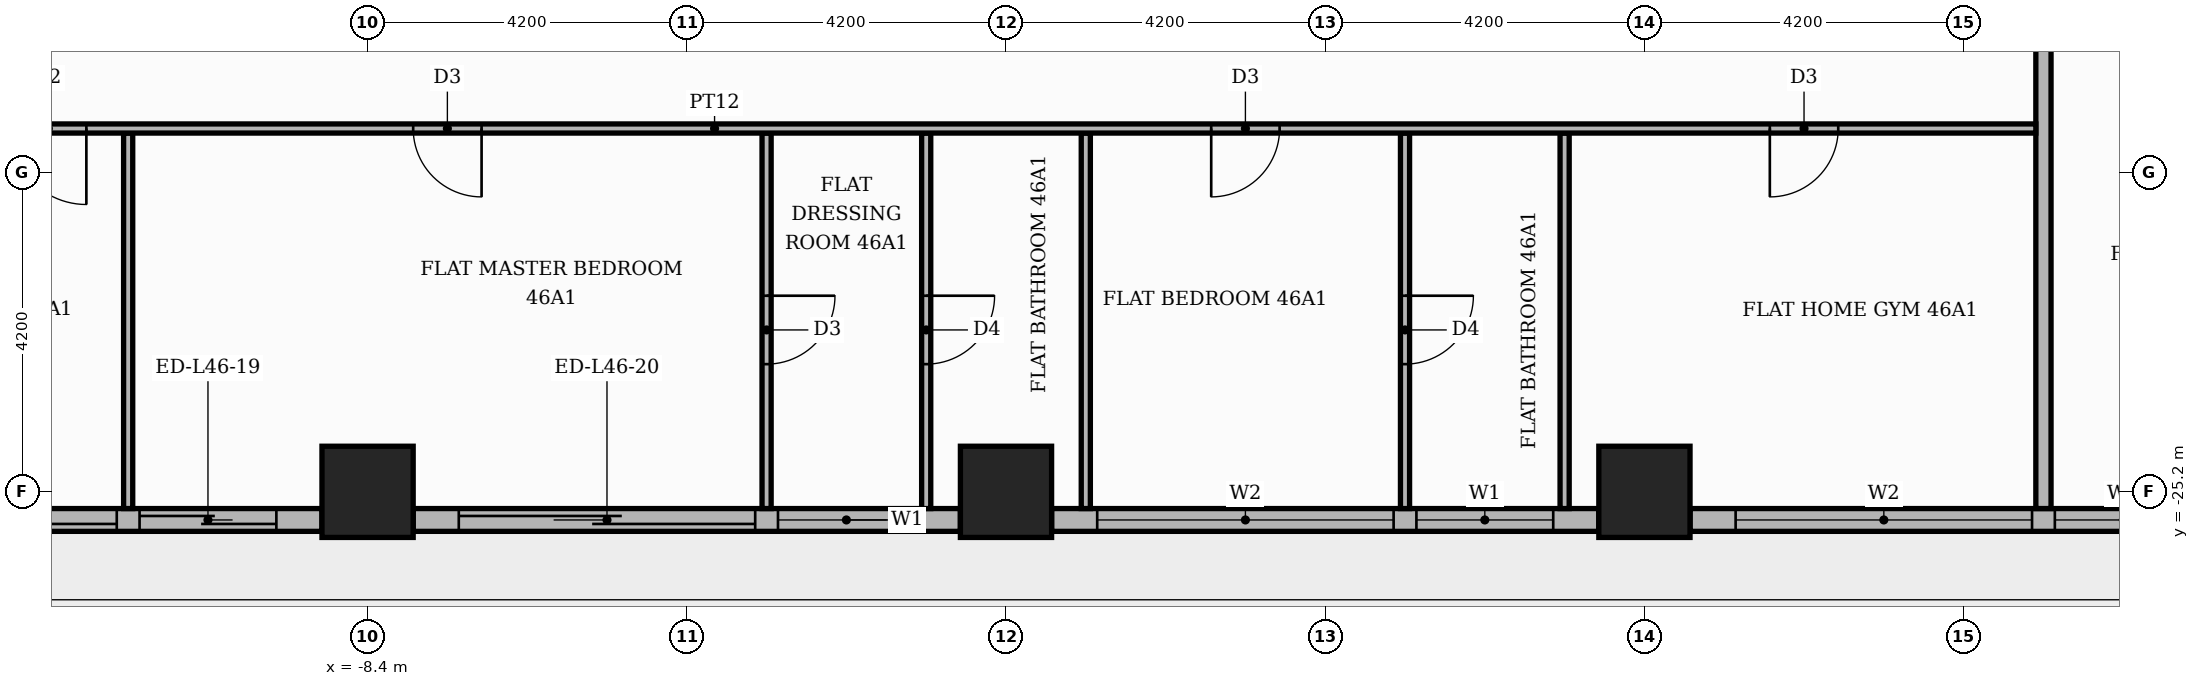
"""IFC4 building model, lengths in metres.
Left out: names, types, materials, properties, quantities, classifications, styles, units other than length and angle.
Written with IfcOpenShell. Run it as: python <this file> out.ifc"""

import sys

from ifc_helpers import new_model, si_unit, direction, frame, frame_2d, origin, origin_2d, place, context, subcontext, project, spatial, rectangle, extrude, element, fill, save


model = new_model("IFC4")
c1 = context("Model", 3, precision=1e-05, world=origin(), true_north=direction((0.0, 1.0)))
c2 = subcontext(c1, "Body", "Model", "MODEL_VIEW")
j1 = project(units=[si_unit("LENGTHUNIT", "METRE"), si_unit("PLANEANGLEUNIT", "RADIAN")], contexts=[c1])
p1 = place(None, origin())
s1 = spatial("IfcSite", under=j1, at=p1, CompositionType="ELEMENT")
p2 = place(p1, origin())
s2 = spatial("IfcBuilding", under=s1, at=p2, CompositionType="ELEMENT")
p3 = place(p2, frame((0.0, 0.0, 196.2)))
s3 = spatial("IfcBuildingStorey", under=s2, at=p3, CompositionType="ELEMENT", Elevation=196.2)
for number, where, z_axis, x_axis in (
    (1, (0.0, -25.2, 0.0), (0.0, 0.0, 1.0), (1.0, 0.0, 0.0)),
    (2, (8.4, -25.2, 0.0), (0.0, 0.0, 1.0), (1.0, 0.0, 0.0)),
    (3, (-8.4, -25.2, 0.0), (0.0, 0.0, 1.0), (1.0, 0.0, 0.0)),
):
    element("IfcColumn", number, at=place(p3, frame(where, z_axis=z_axis, x_axis=x_axis)), inside=s3, PredefinedType="COLUMN", context=c2, shape_type="SweptSolid", body=[
        extrude(rectangle(XDim=1.2, YDim=1.2, at=origin_2d()), origin(), (0.0, 0.0, 1.0), 3.9),
    ])
p4 = place(p3, frame((-16.2, -25.57, 0.0), z_axis=(0.0, 0.0, 1.0), x_axis=(1.0, 0.0, 0.0)))
e4 = element("IfcWall", 4, at=p4, inside=s3, PredefinedType="STANDARD", context=c2, shape_type="SweptSolid", body=[
    extrude(rectangle(XDim=7.2, YDim=0.3, at=frame_2d((3.6, 0.0))), origin(), (0.0, 0.0, 1.0), 3.48),
])
p5 = place(p4, frame((0.6, 0.0, 0.0)))
e5 = element("IfcOpeningElement", 5, at=p5, cuts=e4, PredefinedType="OPENING", context=c2, shape_type="SweptSolid", body=[
    extrude(rectangle(XDim=3.9, YDim=2.4, at=frame_2d((1.95, 1.2))), frame((0.0, 0.16, 0.0), z_axis=(0.0, -1.0, 0.0), x_axis=(1.0, 0.0, 0.0)), (0.0, 0.0, 1.0), 0.32),
])
p6 = place(p4, frame((4.8, 0.0, 0.0)))
e6 = element("IfcOpeningElement", 6, at=p6, cuts=e4, PredefinedType="OPENING", context=c2, shape_type="SweptSolid", body=[
    extrude(rectangle(XDim=1.8, YDim=2.4, at=frame_2d((0.9, 1.2))), frame((0.0, 0.16, 0.0), z_axis=(0.0, -1.0, 0.0), x_axis=(1.0, 0.0, 0.0)), (0.0, 0.0, 1.0), 0.32),
])
p7 = place(p3, frame((-7.8, -25.57, 0.0), z_axis=(0.0, 0.0, 1.0), x_axis=(1.0, 0.0, 0.0)))
e7 = element("IfcWall", 7, at=p7, inside=s3, PredefinedType="STANDARD", context=c2, shape_type="SweptSolid", body=[
    extrude(rectangle(XDim=7.2, YDim=0.3, at=frame_2d((3.6, 0.0))), origin(), (0.0, 0.0, 1.0), 3.48),
])
p8 = place(p7, frame((0.6, 0.0, 0.0)))
e8 = element("IfcOpeningElement", 8, at=p8, cuts=e7, PredefinedType="OPENING", context=c2, shape_type="SweptSolid", body=[
    extrude(rectangle(XDim=3.9, YDim=2.4, at=frame_2d((1.95, 1.2))), frame((0.0, 0.16, 0.0), z_axis=(0.0, -1.0, 0.0), x_axis=(1.0, 0.0, 0.0)), (0.0, 0.0, 1.0), 0.32),
])
p9 = place(p7, frame((4.8, 0.0, 0.9)))
e9 = element("IfcOpeningElement", 9, at=p9, cuts=e7, PredefinedType="OPENING", context=c2, shape_type="SweptSolid", body=[
    extrude(rectangle(XDim=1.8, YDim=2.1, at=frame_2d((0.9, 1.05))), frame((0.0, 0.16, 0.0), z_axis=(0.0, -1.0, 0.0), x_axis=(1.0, 0.0, 0.0)), (0.0, 0.0, 1.0), 0.32),
])
p10 = place(p3, frame((0.6, -25.57, 0.0), z_axis=(0.0, 0.0, 1.0), x_axis=(1.0, 0.0, 0.0)))
e10 = element("IfcWall", 10, at=p10, inside=s3, PredefinedType="STANDARD", context=c2, shape_type="SweptSolid", body=[
    extrude(rectangle(XDim=7.2, YDim=0.3, at=frame_2d((3.6, 0.0))), origin(), (0.0, 0.0, 1.0), 3.48),
])
p11 = place(p10, frame((0.6, 0.0, 0.9)))
e11 = element("IfcOpeningElement", 11, at=p11, cuts=e10, PredefinedType="OPENING", context=c2, shape_type="SweptSolid", body=[
    extrude(rectangle(XDim=3.9, YDim=2.1, at=frame_2d((1.95, 1.05))), frame((0.0, 0.16, 0.0), z_axis=(0.0, -1.0, 0.0), x_axis=(1.0, 0.0, 0.0)), (0.0, 0.0, 1.0), 0.32),
])
p12 = place(p10, frame((4.8, 0.0, 0.9)))
e12 = element("IfcOpeningElement", 12, at=p12, cuts=e10, PredefinedType="OPENING", context=c2, shape_type="SweptSolid", body=[
    extrude(rectangle(XDim=1.8, YDim=2.1, at=frame_2d((0.9, 1.05))), frame((0.0, 0.16, 0.0), z_axis=(0.0, -1.0, 0.0), x_axis=(1.0, 0.0, 0.0)), (0.0, 0.0, 1.0), 0.32),
])
p13 = place(p3, frame((9.0, -25.57, 0.0), z_axis=(0.0, 0.0, 1.0), x_axis=(1.0, 0.0, 0.0)))
e13 = element("IfcWall", 13, at=p13, inside=s3, PredefinedType="STANDARD", context=c2, shape_type="SweptSolid", body=[
    extrude(rectangle(XDim=7.2, YDim=0.3, at=frame_2d((3.6, 0.0))), origin(), (0.0, 0.0, 1.0), 3.48),
])
p14 = place(p13, frame((0.6, 0.0, 0.9)))
e14 = element("IfcOpeningElement", 14, at=p14, cuts=e13, PredefinedType="OPENING", context=c2, shape_type="SweptSolid", body=[
    extrude(rectangle(XDim=3.9, YDim=2.1, at=frame_2d((1.95, 1.05))), frame((0.0, 0.16, 0.0), z_axis=(0.0, -1.0, 0.0), x_axis=(1.0, 0.0, 0.0)), (0.0, 0.0, 1.0), 0.32),
])
p15 = place(p13, frame((4.8, 0.0, 0.9)))
e15 = element("IfcOpeningElement", 15, at=p15, cuts=e13, PredefinedType="OPENING", context=c2, shape_type="SweptSolid", body=[
    extrude(rectangle(XDim=1.8, YDim=2.1, at=frame_2d((0.9, 1.05))), frame((0.0, 0.16, 0.0), z_axis=(0.0, -1.0, 0.0), x_axis=(1.0, 0.0, 0.0)), (0.0, 0.0, 1.0), 0.32),
])
p16 = place(p3, frame((-11.55, -25.42, 0.0), z_axis=(0.0, 0.0, 1.0), x_axis=(0.0, 1.0, 0.0)))
e16 = element("IfcWall", 16, at=p16, inside=s3, PredefinedType="PARTITIONING", context=c2, shape_type="SweptSolid", body=[
    extrude(rectangle(XDim=4.94, YDim=0.12, at=frame_2d((2.47, 0.0))), origin(), (0.0, 0.0, 1.0), 3.48),
])
p17 = place(p3, frame((-3.15, -25.42, 0.0), z_axis=(0.0, 0.0, 1.0), x_axis=(0.0, 1.0, 0.0)))
e17 = element("IfcWall", 17, at=p17, inside=s3, PredefinedType="PARTITIONING", context=c2, shape_type="SweptSolid", body=[
    extrude(rectangle(XDim=4.94, YDim=0.12, at=frame_2d((2.47, 0.0))), origin(), (0.0, 0.0, 1.0), 3.48),
])
p18 = place(p17, frame((1.9, 0.0, 0.0)))
e18 = element("IfcOpeningElement", 18, at=p18, cuts=e17, PredefinedType="OPENING", context=c2, shape_type="SweptSolid", body=[
    extrude(rectangle(XDim=0.9, YDim=2.1, at=frame_2d((0.45, 1.05))), frame((0.0, 0.07, 0.0), z_axis=(0.0, -1.0, 0.0), x_axis=(1.0, 0.0, 0.0)), (0.0, 0.0, 1.0), 0.14),
])
p19 = place(p3, frame((-1.05, -25.42, 0.0), z_axis=(0.0, 0.0, 1.0), x_axis=(0.0, 1.0, 0.0)))
e19 = element("IfcWall", 19, at=p19, inside=s3, PredefinedType="PARTITIONING", context=c2, shape_type="SweptSolid", body=[
    extrude(rectangle(XDim=4.94, YDim=0.12, at=frame_2d((2.47, 0.0))), origin(), (0.0, 0.0, 1.0), 3.48),
])
p20 = place(p19, frame((1.9, 0.0, 0.0)))
e20 = element("IfcOpeningElement", 20, at=p20, cuts=e19, PredefinedType="OPENING", context=c2, shape_type="SweptSolid", body=[
    extrude(rectangle(XDim=0.9, YDim=2.1, at=frame_2d((0.45, 1.05))), frame((0.0, 0.07, 0.0), z_axis=(0.0, -1.0, 0.0), x_axis=(1.0, 0.0, 0.0)), (0.0, 0.0, 1.0), 0.14),
])
p21 = place(p3, frame((1.05, -25.42, 0.0), z_axis=(0.0, 0.0, 1.0), x_axis=(0.0, 1.0, 0.0)))
e21 = element("IfcWall", 21, at=p21, inside=s3, PredefinedType="PARTITIONING", context=c2, shape_type="SweptSolid", body=[
    extrude(rectangle(XDim=4.94, YDim=0.12, at=frame_2d((2.47, 0.0))), origin(), (0.0, 0.0, 1.0), 3.48),
])
p22 = place(p3, frame((5.25, -25.42, 0.0), z_axis=(0.0, 0.0, 1.0), x_axis=(0.0, 1.0, 0.0)))
e22 = element("IfcWall", 22, at=p22, inside=s3, PredefinedType="PARTITIONING", context=c2, shape_type="SweptSolid", body=[
    extrude(rectangle(XDim=4.94, YDim=0.12, at=frame_2d((2.47, 0.0))), origin(), (0.0, 0.0, 1.0), 3.48),
])
p23 = place(p22, frame((1.9, 0.0, 0.0)))
e23 = element("IfcOpeningElement", 23, at=p23, cuts=e22, PredefinedType="OPENING", context=c2, shape_type="SweptSolid", body=[
    extrude(rectangle(XDim=0.9, YDim=2.1, at=frame_2d((0.45, 1.05))), frame((0.0, 0.07, 0.0), z_axis=(0.0, -1.0, 0.0), x_axis=(1.0, 0.0, 0.0)), (0.0, 0.0, 1.0), 0.14),
])
p24 = place(p3, frame((7.35, -25.42, 0.0), z_axis=(0.0, 0.0, 1.0), x_axis=(0.0, 1.0, 0.0)))
e24 = element("IfcWall", 24, at=p24, inside=s3, PredefinedType="PARTITIONING", context=c2, shape_type="SweptSolid", body=[
    extrude(rectangle(XDim=4.94, YDim=0.12, at=frame_2d((2.47, 0.0))), origin(), (0.0, 0.0, 1.0), 3.48),
])
p25 = place(p3, frame((13.65, -25.42, 0.0), z_axis=(0.0, 0.0, 1.0), x_axis=(0.0, 1.0, 0.0)))
e25 = element("IfcWall", 25, at=p25, inside=s3, PredefinedType="PARTITIONING", context=c2, shape_type="SweptSolid", body=[
    extrude(rectangle(XDim=11.67, YDim=0.2, at=frame_2d((5.835, 0.0))), origin(), (0.0, 0.0, 1.0), 3.48),
])
p26 = place(p3, frame((-21.219, -20.42, 0.0), z_axis=(0.0, 0.0, 1.0), x_axis=(1.0, 0.0, 0.0)))
e26 = element("IfcWall", 26, at=p26, inside=s3, PredefinedType="PARTITIONING", context=c2, shape_type="SweptSolid", body=[
    extrude(rectangle(XDim=34.769, YDim=0.12, at=frame_2d((17.385, 0.0))), origin(), (0.0, 0.0, 1.0), 3.48),
])
p27 = place(p26, frame((8.119, 0.0, 0.0)))
e27 = element("IfcOpeningElement", 27, at=p27, cuts=e26, PredefinedType="OPENING", context=c2, shape_type="SweptSolid", body=[
    extrude(rectangle(XDim=1.0, YDim=2.1, at=frame_2d((0.5, 1.05))), frame((0.0, 0.07, 0.0), z_axis=(0.0, -1.0, 0.0), x_axis=(1.0, 0.0, 0.0)), (0.0, 0.0, 1.0), 0.14),
])
p28 = place(p26, frame((13.419, 0.0, 0.0)))
e28 = element("IfcOpeningElement", 28, at=p28, cuts=e26, PredefinedType="OPENING", context=c2, shape_type="SweptSolid", body=[
    extrude(rectangle(XDim=0.9, YDim=2.1, at=frame_2d((0.45, 1.05))), frame((0.0, 0.07, 0.0), z_axis=(0.0, -1.0, 0.0), x_axis=(1.0, 0.0, 0.0)), (0.0, 0.0, 1.0), 0.14),
])
p29 = place(p26, frame((23.919, 0.0, 0.0)))
e29 = element("IfcOpeningElement", 29, at=p29, cuts=e26, PredefinedType="OPENING", context=c2, shape_type="SweptSolid", body=[
    extrude(rectangle(XDim=0.9, YDim=2.1, at=frame_2d((0.45, 1.05))), frame((0.0, 0.07, 0.0), z_axis=(0.0, -1.0, 0.0), x_axis=(1.0, 0.0, 0.0)), (0.0, 0.0, 1.0), 0.14),
])
p30 = place(p26, frame((31.269, 0.0, 0.0)))
e30 = element("IfcOpeningElement", 30, at=p30, cuts=e26, PredefinedType="OPENING", context=c2, shape_type="SweptSolid", body=[
    extrude(rectangle(XDim=0.9, YDim=2.1, at=frame_2d((0.45, 1.05))), frame((0.0, 0.07, 0.0), z_axis=(0.0, -1.0, 0.0), x_axis=(1.0, 0.0, 0.0)), (0.0, 0.0, 1.0), 0.14),
])
p31 = place(p5, origin())
e31 = element("IfcDoor", 31, at=p31, inside=s3, OperationType="SLIDING_TO_LEFT", PredefinedType="DOOR", context=c2, shape_type="SweptSolid", body=[
    extrude(rectangle(XDim=3.9, YDim=2.4, at=frame_2d((1.95, 1.2))), frame((0.0, 0.025, 0.0), z_axis=(0.0, -1.0, 0.0), x_axis=(1.0, 0.0, 0.0)), (0.0, 0.0, 1.0), 0.05),
])
fill(e5, e31)
p32 = place(p6, origin())
e32 = element("IfcDoor", 32, at=p32, inside=s3, OperationType="SLIDING_TO_RIGHT", PredefinedType="DOOR", context=c2, shape_type="SweptSolid", body=[
    extrude(rectangle(XDim=1.8, YDim=2.4, at=frame_2d((0.9, 1.2))), frame((0.0, 0.025, 0.0), z_axis=(0.0, -1.0, 0.0), x_axis=(1.0, 0.0, 0.0)), (0.0, 0.0, 1.0), 0.05),
])
fill(e6, e32)
p33 = place(p8, origin())
e33 = element("IfcDoor", 33, at=p33, inside=s3, OperationType="SLIDING_TO_LEFT", PredefinedType="DOOR", context=c2, shape_type="SweptSolid", body=[
    extrude(rectangle(XDim=3.9, YDim=2.4, at=frame_2d((1.95, 1.2))), frame((0.0, 0.025, 0.0), z_axis=(0.0, -1.0, 0.0), x_axis=(1.0, 0.0, 0.0)), (0.0, 0.0, 1.0), 0.05),
])
fill(e8, e33)
p34 = place(p9, origin())
e34 = element("IfcWindow", 34, at=p34, inside=s3, PartitioningType="SINGLE_PANEL", PredefinedType="WINDOW", context=c2, shape_type="SweptSolid", body=[
    extrude(rectangle(XDim=1.8, YDim=2.1, at=frame_2d((0.9, 1.05))), frame((0.0, 0.03, 0.0), z_axis=(0.0, -1.0, 0.0), x_axis=(1.0, 0.0, 0.0)), (0.0, 0.0, 1.0), 0.06),
])
fill(e9, e34)
p35 = place(p11, origin())
e35 = element("IfcWindow", 35, at=p35, inside=s3, PartitioningType="SINGLE_PANEL", PredefinedType="WINDOW", context=c2, shape_type="SweptSolid", body=[
    extrude(rectangle(XDim=3.9, YDim=2.1, at=frame_2d((1.95, 1.05))), frame((0.0, 0.03, 0.0), z_axis=(0.0, -1.0, 0.0), x_axis=(1.0, 0.0, 0.0)), (0.0, 0.0, 1.0), 0.06),
])
fill(e11, e35)
p36 = place(p12, origin())
e36 = element("IfcWindow", 36, at=p36, inside=s3, PartitioningType="SINGLE_PANEL", PredefinedType="WINDOW", context=c2, shape_type="SweptSolid", body=[
    extrude(rectangle(XDim=1.8, YDim=2.1, at=frame_2d((0.9, 1.05))), frame((0.0, 0.03, 0.0), z_axis=(0.0, -1.0, 0.0), x_axis=(1.0, 0.0, 0.0)), (0.0, 0.0, 1.0), 0.06),
])
fill(e12, e36)
p37 = place(p14, origin())
e37 = element("IfcWindow", 37, at=p37, inside=s3, PartitioningType="SINGLE_PANEL", PredefinedType="WINDOW", context=c2, shape_type="SweptSolid", body=[
    extrude(rectangle(XDim=3.9, YDim=2.1, at=frame_2d((1.95, 1.05))), frame((0.0, 0.03, 0.0), z_axis=(0.0, -1.0, 0.0), x_axis=(1.0, 0.0, 0.0)), (0.0, 0.0, 1.0), 0.06),
])
fill(e14, e37)
p38 = place(p15, origin())
e38 = element("IfcWindow", 38, at=p38, inside=s3, PartitioningType="SINGLE_PANEL", PredefinedType="WINDOW", context=c2, shape_type="SweptSolid", body=[
    extrude(rectangle(XDim=1.8, YDim=2.1, at=frame_2d((0.9, 1.05))), frame((0.0, 0.03, 0.0), z_axis=(0.0, -1.0, 0.0), x_axis=(1.0, 0.0, 0.0)), (0.0, 0.0, 1.0), 0.06),
])
fill(e15, e38)
p39 = place(p27, frame((1.0, 0.0, 0.0), z_axis=(0.0, 0.0, 1.0), x_axis=(-1.0, 0.0, 0.0)))
e39 = element("IfcDoor", 39, at=p39, inside=s3, OperationType="SINGLE_SWING_RIGHT", PredefinedType="DOOR", context=c2, shape_type="SweptSolid", body=[
    extrude(rectangle(XDim=1.0, YDim=2.1, at=frame_2d((0.5, 1.05))), frame((0.0, 0.025, 0.0), z_axis=(0.0, -1.0, 0.0), x_axis=(1.0, 0.0, 0.0)), (0.0, 0.0, 1.0), 0.05),
])
fill(e27, e39)
p40 = place(p28, frame((0.9, 0.0, 0.0), z_axis=(0.0, 0.0, 1.0), x_axis=(-1.0, 0.0, 0.0)))
e40 = element("IfcDoor", 40, at=p40, inside=s3, OperationType="SINGLE_SWING_RIGHT", PredefinedType="DOOR", context=c2, shape_type="SweptSolid", body=[
    extrude(rectangle(XDim=0.9, YDim=2.1, at=frame_2d((0.45, 1.05))), frame((0.0, 0.025, 0.0), z_axis=(0.0, -1.0, 0.0), x_axis=(1.0, 0.0, 0.0)), (0.0, 0.0, 1.0), 0.05),
])
fill(e28, e40)
p41 = place(p18, frame((0.9, 0.0, 0.0), z_axis=(0.0, 0.0, 1.0), x_axis=(-1.0, 0.0, 0.0)))
e41 = element("IfcDoor", 41, at=p41, inside=s3, OperationType="SINGLE_SWING_RIGHT", PredefinedType="DOOR", context=c2, shape_type="SweptSolid", body=[
    extrude(rectangle(XDim=0.9, YDim=2.1, at=frame_2d((0.45, 1.05))), frame((0.0, 0.025, 0.0), z_axis=(0.0, -1.0, 0.0), x_axis=(1.0, 0.0, 0.0)), (0.0, 0.0, 1.0), 0.05),
])
fill(e18, e41)
p42 = place(p20, frame((0.9, 0.0, 0.0), z_axis=(0.0, 0.0, 1.0), x_axis=(-1.0, 0.0, 0.0)))
e42 = element("IfcDoor", 42, at=p42, inside=s3, OperationType="SINGLE_SWING_RIGHT", PredefinedType="DOOR", context=c2, shape_type="SweptSolid", body=[
    extrude(rectangle(XDim=0.9, YDim=2.1, at=frame_2d((0.45, 1.05))), frame((0.0, 0.025, 0.0), z_axis=(0.0, -1.0, 0.0), x_axis=(1.0, 0.0, 0.0)), (0.0, 0.0, 1.0), 0.05),
])
fill(e20, e42)
p43 = place(p29, frame((0.9, 0.0, 0.0), z_axis=(0.0, 0.0, 1.0), x_axis=(-1.0, 0.0, 0.0)))
e43 = element("IfcDoor", 43, at=p43, inside=s3, OperationType="SINGLE_SWING_LEFT", PredefinedType="DOOR", context=c2, shape_type="SweptSolid", body=[
    extrude(rectangle(XDim=0.9, YDim=2.1, at=frame_2d((0.45, 1.05))), frame((0.0, 0.025, 0.0), z_axis=(0.0, -1.0, 0.0), x_axis=(1.0, 0.0, 0.0)), (0.0, 0.0, 1.0), 0.05),
])
fill(e29, e43)
p44 = place(p23, frame((0.9, 0.0, 0.0), z_axis=(0.0, 0.0, 1.0), x_axis=(-1.0, 0.0, 0.0)))
e44 = element("IfcDoor", 44, at=p44, inside=s3, OperationType="SINGLE_SWING_RIGHT", PredefinedType="DOOR", context=c2, shape_type="SweptSolid", body=[
    extrude(rectangle(XDim=0.9, YDim=2.1, at=frame_2d((0.45, 1.05))), frame((0.0, 0.025, 0.0), z_axis=(0.0, -1.0, 0.0), x_axis=(1.0, 0.0, 0.0)), (0.0, 0.0, 1.0), 0.05),
])
fill(e23, e44)
p45 = place(p30, frame((0.9, 0.0, 0.0), z_axis=(0.0, 0.0, 1.0), x_axis=(-1.0, 0.0, 0.0)))
e45 = element("IfcDoor", 45, at=p45, inside=s3, OperationType="SINGLE_SWING_LEFT", PredefinedType="DOOR", context=c2, shape_type="SweptSolid", body=[
    extrude(rectangle(XDim=0.9, YDim=2.1, at=frame_2d((0.45, 1.05))), frame((0.0, 0.025, 0.0), z_axis=(0.0, -1.0, 0.0), x_axis=(1.0, 0.0, 0.0)), (0.0, 0.0, 1.0), 0.05),
])
fill(e30, e45)
save(model, sys.argv[1])
